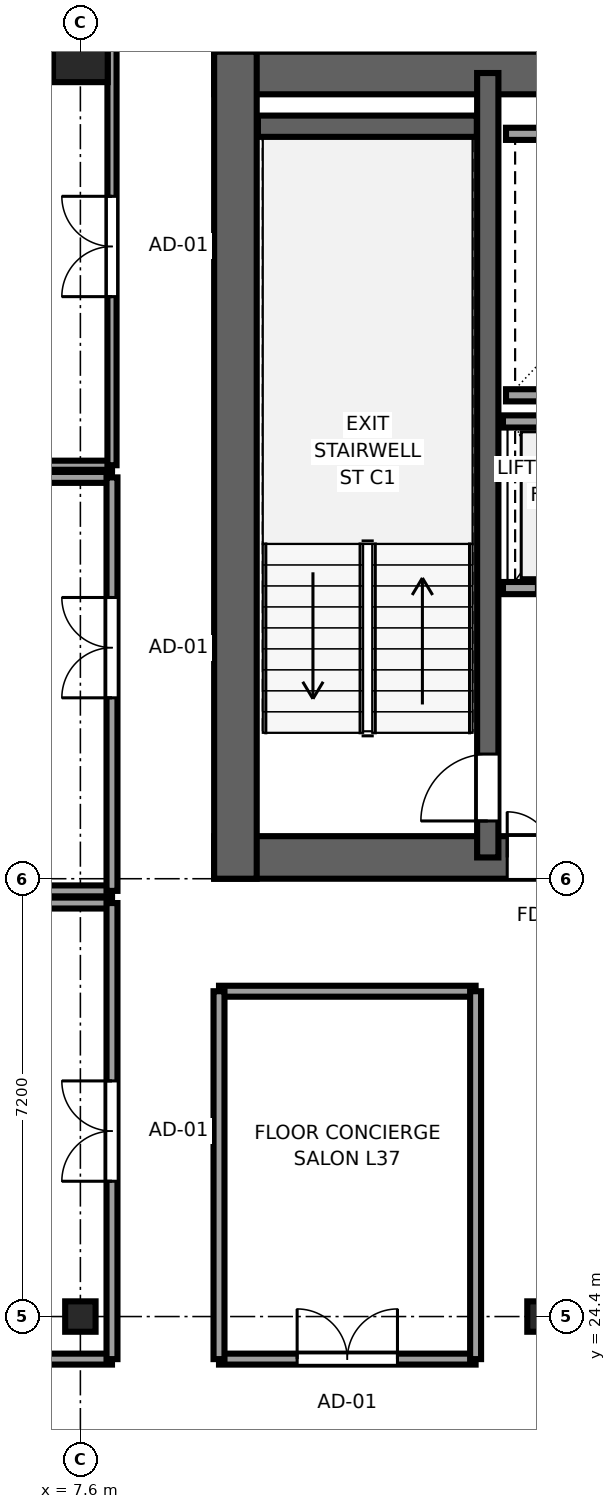
"""IFC4 building model, lengths in metres.
Left out: names, types, materials, properties, quantities, classifications, styles, units other than length and angle.
Written with IfcOpenShell. Run it as: python <this file> out.ifc"""

import sys

from ifc_helpers import new_model, si_unit, direction, frame, frame_2d, origin, origin_2d, place, context, subcontext, project, spatial, rectangle, i_section, extrude, source, transform, mapped, element, fill, save


model = new_model("IFC4")
c1 = context("Model", 3, precision=1e-05, world=origin(), true_north=direction((0.0, 1.0)))
c2 = subcontext(c1, "Body", "Model", "MODEL_VIEW")
j1 = project(units=[si_unit("LENGTHUNIT", "METRE"), si_unit("PLANEANGLEUNIT", "RADIAN")], contexts=[c1])
p1 = place(None, origin())
s1 = spatial("IfcSite", under=j1, at=p1, CompositionType="ELEMENT")
p2 = place(p1, origin())
s2 = spatial("IfcBuilding", under=s1, at=p2, CompositionType="ELEMENT")
p3 = place(p2, frame((0.0, 0.0, 143.5)))
s3 = spatial("IfcBuildingStorey", under=s2, at=p3, CompositionType="ELEMENT", Elevation=143.5)
p4 = place(p3, frame((9.8, 31.95, 0.0), z_axis=(0.0, 0.0, 1.0), x_axis=(1.0, 0.0, 0.0)))
e1 = element("IfcWall", 1, at=p4, inside=s3, PredefinedType="SHEAR", context=c2, shape_type="SweptSolid", body=[
    extrude(rectangle(XDim=26.4, YDim=0.7, at=frame_2d((13.2, 0.0))), origin(), (0.0, 0.0, 1.0), 3.55),
])
p5 = place(p4, frame((6.32, 0.0, 0.0), z_axis=(0.0, 0.0, 1.0), x_axis=(-1.0, 0.0, 0.0)))
e2 = element("IfcOpeningElement", 2, at=p5, cuts=e1, PredefinedType="OPENING", context=c2, shape_type="SweptSolid", body=[
    extrude(rectangle(XDim=1.5, YDim=2.04, at=frame_2d((0.75, 1.02))), frame((0.0, 0.36, 0.0), z_axis=(0.0, -1.0, 0.0), x_axis=(1.0, 0.0, 0.0)), (0.0, 0.0, 1.0), 0.72),
])
p6 = place(p4, frame((13.95, 0.0, 0.0), z_axis=(0.0, 0.0, 1.0), x_axis=(-1.0, 0.0, 0.0)))
e3 = element("IfcOpeningElement", 3, at=p6, cuts=e1, PredefinedType="OPENING", context=c2, shape_type="SweptSolid", body=[
    extrude(rectangle(XDim=1.5, YDim=2.04, at=frame_2d((0.75, 1.02))), frame((0.0, 0.36, 0.0), z_axis=(0.0, -1.0, 0.0), x_axis=(1.0, 0.0, 0.0)), (0.0, 0.0, 1.0), 0.72),
])
p7 = place(p4, frame((20.25, 0.0, 0.0), z_axis=(0.0, 0.0, 1.0), x_axis=(-1.0, 0.0, 0.0)))
e4 = element("IfcOpeningElement", 4, at=p7, cuts=e1, PredefinedType="OPENING", context=c2, shape_type="SweptSolid", body=[
    extrude(rectangle(XDim=1.5, YDim=2.04, at=frame_2d((0.75, 1.02))), frame((0.0, 0.36, 0.0), z_axis=(0.0, -1.0, 0.0), x_axis=(1.0, 0.0, 0.0)), (0.0, 0.0, 1.0), 0.72),
])
p8 = place(p4, frame((8.37, 0.0, 0.0), z_axis=(0.0, 0.0, 1.0), x_axis=(-1.0, 0.0, 0.0)))
e5 = element("IfcOpeningElement", 5, at=p8, cuts=e1, PredefinedType="OPENING", context=c2, shape_type="SweptSolid", body=[
    extrude(rectangle(XDim=0.82, YDim=2.01, at=frame_2d((0.41, 1.005))), frame((0.0, 0.36, 0.0), z_axis=(0.0, -1.0, 0.0), x_axis=(1.0, 0.0, 0.0)), (0.0, 0.0, 1.0), 0.72),
])
p9 = place(p3, frame((9.8, 44.85, 0.0), z_axis=(0.0, 0.0, 1.0), x_axis=(1.0, 0.0, 0.0)))
e6 = element("IfcWall", 6, at=p9, inside=s3, PredefinedType="SHEAR", context=c2, shape_type="SweptSolid", body=[
    extrude(rectangle(XDim=26.4, YDim=0.7, at=frame_2d((13.2, 0.0))), origin(), (0.0, 0.0, 1.0), 3.55),
])
p10 = place(p3, frame((10.15, 31.6, 0.0), z_axis=(0.0, 0.0, 1.0), x_axis=(0.0, 1.0, 0.0)))
e7 = element("IfcWall", 7, at=p10, inside=s3, PredefinedType="SHEAR", context=c2, shape_type="SweptSolid", body=[
    extrude(rectangle(XDim=13.6, YDim=0.7, at=frame_2d((6.8, 0.0))), origin(), (0.0, 0.0, 1.0), 3.55),
])
p11 = place(p3, frame((14.3, 31.95, 0.0), z_axis=(0.0, 0.0, 1.0), x_axis=(0.0, 1.0, 0.0)))
e8 = element("IfcWall", 8, at=p11, inside=s3, PredefinedType="SHEAR", context=c2, shape_type="SweptSolid", body=[
    extrude(rectangle(XDim=12.9, YDim=0.35, at=frame_2d((6.45, 0.0))), origin(), (0.0, 0.0, 1.0), 3.55),
])
p12 = place(p11, frame((0.6, 0.0, 0.0)))
e9 = element("IfcOpeningElement", 9, at=p12, cuts=e8, PredefinedType="OPENING", context=c2, shape_type="SweptSolid", body=[
    extrude(rectangle(XDim=1.1, YDim=2.12, at=frame_2d((0.55, 1.06))), frame((0.0, 0.185, 0.0), z_axis=(0.0, -1.0, 0.0), x_axis=(1.0, 0.0, 0.0)), (0.0, 0.0, 1.0), 0.37),
])
p13 = place(p3, frame((10.52, 43.975, 0.0), z_axis=(0.0, 0.0, 1.0), x_axis=(1.0, 0.0, 0.0)))
e10 = element("IfcWall", 10, at=p13, inside=s3, PredefinedType="SHEAR", context=c2, shape_type="SweptSolid", body=[
    extrude(rectangle(XDim=3.6, YDim=0.35, at=frame_2d((1.8, 0.0))), origin(), (0.0, 0.0, 1.0), 3.55),
])
m1 = source(origin(), c2, "Body", "SweptSolid", [
    extrude(i_section(OverallWidth=0.5, OverallDepth=0.5, WebThickness=0.022, FlangeThickness=0.034, at=origin_2d()), origin(), (0.0, 0.0, 1.0), 3.55),
])
for number, where, z_axis, x_axis in (
    (11, (7.6, 24.4, 0.0), (0.0, 0.0, 1.0), (1.0, 0.0, 0.0)),
    (12, (15.2, 24.4, 0.0), (0.0, 0.0, 1.0), (1.0, 0.0, 0.0)),
):
    element("IfcColumn", number, at=place(p3, frame(where, z_axis=z_axis, x_axis=x_axis)), inside=s3, PredefinedType="COLUMN", context=c2, shape_type="MappedRepresentation", body=[
        mapped(m1, transform((0.0, 0.0, 0.0), x_axis=(1.0, 0.0, 0.0), y_axis=(0.0, 1.0, 0.0), z_axis=(0.0, 0.0, 1.0), scale=1.0)),
    ])
m2 = source(origin(), c2, "Body", "SweptSolid", [
    extrude(rectangle(XDim=0.9, YDim=0.9, at=origin_2d()), origin(), (0.0, 0.0, 1.0), 3.55),
])
p14 = place(p3, frame((7.6, 45.15, 0.0), z_axis=(0.0, 0.0, 1.0), x_axis=(1.0, 0.0, 0.0)))
e13 = element("IfcColumn", 13, at=p14, inside=s3, PredefinedType="COLUMN", context=c2, shape_type="MappedRepresentation", body=[
    mapped(m2, transform((0.0, 0.0, 0.0), x_axis=(1.0, 0.0, 0.0), y_axis=(0.0, 1.0, 0.0), z_axis=(0.0, 0.0, 1.0), scale=1.0)),
])
for number, where, z_axis, x_axis in (
    (14, (14.6, 39.55, 0.0), (0.0, 0.0, 1.0), (1.0, 0.0, 0.0)),
    (15, (14.6, 43.85, 0.0), (0.0, 0.0, 1.0), (1.0, 0.0, 0.0)),
):
    element("IfcWall", number, at=place(p3, frame(where, z_axis=z_axis, x_axis=x_axis)), inside=s3, PredefinedType="SOLIDWALL", context=c2, shape_type="SweptSolid", body=[
        extrude(rectangle(XDim=4.1, YDim=0.2, at=frame_2d((2.05, 0.0))), origin(), (0.0, 0.0, 1.0), 3.29),
    ])
p15 = place(p3, frame((14.55, 36.38, 0.0), z_axis=(0.0, 0.0, 1.0), x_axis=(1.0, 0.0, 0.0)))
e16 = element("IfcWall", 16, at=p15, inside=s3, PredefinedType="SOLIDWALL", context=c2, shape_type="SweptSolid", body=[
    extrude(rectangle(XDim=4.075, YDim=0.2, at=frame_2d((2.038, 0.0))), origin(), (0.0, 0.0, 1.0), 3.29),
])
p16 = place(p15, frame((0.55, 0.0, 0.0)))
e17 = element("IfcOpeningElement", 17, at=p16, cuts=e16, PredefinedType="OPENING", context=c2, shape_type="SweptSolid", body=[
    extrude(rectangle(XDim=1.1, YDim=2.12, at=frame_2d((0.55, 1.06))), frame((0.0, 0.11, 0.0), z_axis=(0.0, -1.0, 0.0), x_axis=(1.0, 0.0, 0.0)), (0.0, 0.0, 1.0), 0.22),
])
p17 = place(p15, frame((2.45, 0.0, 0.0)))
e18 = element("IfcOpeningElement", 18, at=p17, cuts=e16, PredefinedType="OPENING", context=c2, shape_type="SweptSolid", body=[
    extrude(rectangle(XDim=1.1, YDim=2.12, at=frame_2d((0.55, 1.06))), frame((0.0, 0.11, 0.0), z_axis=(0.0, -1.0, 0.0), x_axis=(1.0, 0.0, 0.0)), (0.0, 0.0, 1.0), 0.22),
])
p18 = place(p3, frame((14.55, 39.12, 0.0), z_axis=(0.0, 0.0, 1.0), x_axis=(1.0, 0.0, 0.0)))
e19 = element("IfcWall", 19, at=p18, inside=s3, PredefinedType="SOLIDWALL", context=c2, shape_type="SweptSolid", body=[
    extrude(rectangle(XDim=4.075, YDim=0.2, at=frame_2d((2.038, 0.0))), origin(), (0.0, 0.0, 1.0), 3.29),
])
for number, where, z_axis, x_axis in (
    (20, (0.405, 23.7, 0.0), (0.0, 0.0, 1.0), (1.0, 0.0, 0.0)),
    (21, (0.405, 31.2, 0.0), (0.0, 0.0, 1.0), (1.0, 0.0, 0.0)),
):
    element("IfcWall", number, at=place(p3, frame(where, z_axis=z_axis, x_axis=x_axis)), inside=s3, PredefinedType="PARTITIONING", context=c2, shape_type="SweptSolid", body=[
        extrude(rectangle(XDim=7.715, YDim=0.18, at=frame_2d((3.857, 0.0))), origin(), (0.0, 0.0, 1.0), 3.29),
    ])
p19 = place(p3, frame((8.12, 23.7, 0.0), z_axis=(0.0, 0.0, 1.0), x_axis=(0.0, 1.0, 0.0)))
e22 = element("IfcWall", 22, at=p19, inside=s3, PredefinedType="PARTITIONING", context=c2, shape_type="SweptSolid", body=[
    extrude(rectangle(XDim=7.5, YDim=0.18, at=frame_2d((3.75, 0.0))), origin(), (0.0, 0.0, 1.0), 3.29),
])
p20 = place(p19, frame((2.925, 0.0, 0.0)))
e23 = element("IfcOpeningElement", 23, at=p20, cuts=e22, PredefinedType="OPENING", context=c2, shape_type="SweptSolid", body=[
    extrude(rectangle(XDim=1.65, YDim=2.15, at=frame_2d((0.825, 1.075))), frame((0.0, 0.1, 0.0), z_axis=(0.0, -1.0, 0.0), x_axis=(1.0, 0.0, 0.0)), (0.0, 0.0, 1.0), 0.2),
])
for number, where, z_axis, x_axis in (
    (24, (0.405, 31.4, 0.0), (0.0, 0.0, 1.0), (1.0, 0.0, 0.0)),
    (25, (0.405, 38.2, 0.0), (0.0, 0.0, 1.0), (1.0, 0.0, 0.0)),
):
    element("IfcWall", number, at=place(p3, frame(where, z_axis=z_axis, x_axis=x_axis)), inside=s3, PredefinedType="PARTITIONING", context=c2, shape_type="SweptSolid", body=[
        extrude(rectangle(XDim=7.715, YDim=0.18, at=frame_2d((3.857, 0.0))), origin(), (0.0, 0.0, 1.0), 3.29),
    ])
p21 = place(p3, frame((8.12, 31.4, 0.0), z_axis=(0.0, 0.0, 1.0), x_axis=(0.0, 1.0, 0.0)))
e26 = element("IfcWall", 26, at=p21, inside=s3, PredefinedType="PARTITIONING", context=c2, shape_type="SweptSolid", body=[
    extrude(rectangle(XDim=6.8, YDim=0.18, at=frame_2d((3.4, 0.0))), origin(), (0.0, 0.0, 1.0), 3.29),
])
p22 = place(p21, frame((3.175, 0.0, 0.0)))
e27 = element("IfcOpeningElement", 27, at=p22, cuts=e26, PredefinedType="OPENING", context=c2, shape_type="SweptSolid", body=[
    extrude(rectangle(XDim=1.65, YDim=2.15, at=frame_2d((0.825, 1.075))), frame((0.0, 0.1, 0.0), z_axis=(0.0, -1.0, 0.0), x_axis=(1.0, 0.0, 0.0)), (0.0, 0.0, 1.0), 0.2),
])
p23 = place(p3, frame((0.405, 38.4, 0.0), z_axis=(0.0, 0.0, 1.0), x_axis=(1.0, 0.0, 0.0)))
e28 = element("IfcWall", 28, at=p23, inside=s3, PredefinedType="PARTITIONING", context=c2, shape_type="SweptSolid", body=[
    extrude(rectangle(XDim=7.715, YDim=0.15, at=frame_2d((3.857, 0.0))), origin(), (0.0, 0.0, 1.0), 3.29),
])
p24 = place(p3, frame((8.12, 38.4, 0.0), z_axis=(0.0, 0.0, 1.0), x_axis=(0.0, 1.0, 0.0)))
e29 = element("IfcWall", 29, at=p24, inside=s3, PredefinedType="PARTITIONING", context=c2, shape_type="SweptSolid", body=[
    extrude(rectangle(XDim=7.195, YDim=0.15, at=frame_2d((3.598, 0.0))), origin(), (0.0, 0.0, 1.0), 3.29),
])
p25 = place(p24, frame((2.772, 0.0, 0.0)))
e30 = element("IfcOpeningElement", 30, at=p25, cuts=e29, PredefinedType="OPENING", context=c2, shape_type="SweptSolid", body=[
    extrude(rectangle(XDim=1.65, YDim=2.15, at=frame_2d((0.825, 1.075))), frame((0.0, 0.085, 0.0), z_axis=(0.0, -1.0, 0.0), x_axis=(1.0, 0.0, 0.0)), (0.0, 0.0, 1.0), 0.17),
])
p26 = place(p3, frame((9.88, 23.7, 0.0), z_axis=(0.0, 0.0, 1.0), x_axis=(1.0, 0.0, 0.0)))
e31 = element("IfcWall", 31, at=p26, inside=s3, PredefinedType="PARTITIONING", context=c2, shape_type="SweptSolid", body=[
    extrude(rectangle(XDim=4.22, YDim=0.18, at=frame_2d((2.11, 0.0))), origin(), (0.0, 0.0, 1.0), 3.29),
])
p27 = place(p26, frame((1.285, 0.0, 0.0)))
e32 = element("IfcOpeningElement", 32, at=p27, cuts=e31, PredefinedType="OPENING", context=c2, shape_type="SweptSolid", body=[
    extrude(rectangle(XDim=1.65, YDim=2.15, at=frame_2d((0.825, 1.075))), frame((0.0, 0.1, 0.0), z_axis=(0.0, -1.0, 0.0), x_axis=(1.0, 0.0, 0.0)), (0.0, 0.0, 1.0), 0.2),
])
p28 = place(p3, frame((9.88, 29.75, 0.0), z_axis=(0.0, 0.0, 1.0), x_axis=(1.0, 0.0, 0.0)))
e33 = element("IfcWall", 33, at=p28, inside=s3, PredefinedType="PARTITIONING", context=c2, shape_type="SweptSolid", body=[
    extrude(rectangle(XDim=4.22, YDim=0.18, at=frame_2d((2.11, 0.0))), origin(), (0.0, 0.0, 1.0), 3.29),
])
for number, where, z_axis, x_axis in (
    (34, (9.88, 23.7, 0.0), (0.0, 0.0, 1.0), (0.0, 1.0, 0.0)),
    (35, (14.1, 23.7, 0.0), (0.0, 0.0, 1.0), (0.0, 1.0, 0.0)),
):
    element("IfcWall", number, at=place(p3, frame(where, z_axis=z_axis, x_axis=x_axis)), inside=s3, PredefinedType="PARTITIONING", context=c2, shape_type="SweptSolid", body=[
        extrude(rectangle(XDim=6.05, YDim=0.18, at=frame_2d((3.025, 0.0))), origin(), (0.0, 0.0, 1.0), 3.29),
    ])
m3 = source(origin(), c2, "Body", "SweptSolid", [
    extrude(rectangle(XDim=1.1, YDim=2.12, at=frame_2d((0.55, 1.06))), frame((0.0, 0.025, 0.0), z_axis=(0.0, -1.0, 0.0), x_axis=(1.0, 0.0, 0.0)), (0.0, 0.0, 1.0), 0.05),
])
p29 = place(p12, origin())
e36 = element("IfcDoor", 36, at=p29, inside=s3, OperationType="SINGLE_SWING_LEFT", PredefinedType="DOOR", context=c2, shape_type="MappedRepresentation", body=[
    mapped(m3, transform((0.0, 0.0, 0.0), x_axis=(1.0, 0.0, 0.0), y_axis=(0.0, 1.0, 0.0), z_axis=(0.0, 0.0, 1.0), scale=1.0)),
])
fill(e9, e36)
m4 = source(origin(), c2, "Body", "SweptSolid", [
    extrude(rectangle(XDim=1.5, YDim=2.04, at=frame_2d((0.75, 1.02))), frame((0.0, 0.025, 0.0), z_axis=(0.0, -1.0, 0.0), x_axis=(1.0, 0.0, 0.0)), (0.0, 0.0, 1.0), 0.05),
])
p30 = place(p5, origin())
e37 = element("IfcDoor", 37, at=p30, inside=s3, OperationType="DOUBLE_DOOR_SINGLE_SWING", PredefinedType="DOOR", context=c2, shape_type="MappedRepresentation", body=[
    mapped(m4, transform((0.0, 0.0, 0.0), x_axis=(1.0, 0.0, 0.0), y_axis=(0.0, 1.0, 0.0), z_axis=(0.0, 0.0, 1.0), scale=1.0)),
])
fill(e2, e37)
m5 = source(origin(), c2, "Body", "SweptSolid", [
    extrude(rectangle(XDim=1.65, YDim=2.15, at=frame_2d((0.825, 1.075))), frame((0.0, 0.025, 0.0), z_axis=(0.0, -1.0, 0.0), x_axis=(1.0, 0.0, 0.0)), (0.0, 0.0, 1.0), 0.05),
])
p31 = place(p20, origin())
e38 = element("IfcDoor", 38, at=p31, inside=s3, OperationType="DOUBLE_DOOR_SINGLE_SWING", PredefinedType="DOOR", context=c2, shape_type="MappedRepresentation", body=[
    mapped(m5, transform((0.0, 0.0, 0.0), x_axis=(1.0, 0.0, 0.0), y_axis=(0.0, 1.0, 0.0), z_axis=(0.0, 0.0, 1.0), scale=1.0)),
])
fill(e23, e38)
p32 = place(p22, origin())
e39 = element("IfcDoor", 39, at=p32, inside=s3, OperationType="DOUBLE_DOOR_SINGLE_SWING", PredefinedType="DOOR", context=c2, shape_type="MappedRepresentation", body=[
    mapped(m5, transform((0.0, 0.0, 0.0), x_axis=(1.0, 0.0, 0.0), y_axis=(0.0, 1.0, 0.0), z_axis=(0.0, 0.0, 1.0), scale=1.0)),
])
fill(e27, e39)
p33 = place(p25, origin())
e40 = element("IfcDoor", 40, at=p33, inside=s3, OperationType="DOUBLE_DOOR_SINGLE_SWING", PredefinedType="DOOR", context=c2, shape_type="MappedRepresentation", body=[
    mapped(m5, transform((0.0, 0.0, 0.0), x_axis=(1.0, 0.0, 0.0), y_axis=(0.0, 1.0, 0.0), z_axis=(0.0, 0.0, 1.0), scale=1.0)),
])
fill(e30, e40)
p34 = place(p27, origin())
e41 = element("IfcDoor", 41, at=p34, inside=s3, OperationType="DOUBLE_DOOR_SINGLE_SWING", PredefinedType="DOOR", context=c2, shape_type="MappedRepresentation", body=[
    mapped(m5, transform((0.0, 0.0, 0.0), x_axis=(1.0, 0.0, 0.0), y_axis=(0.0, 1.0, 0.0), z_axis=(0.0, 0.0, 1.0), scale=1.0)),
])
fill(e32, e41)
save(model, sys.argv[1])
